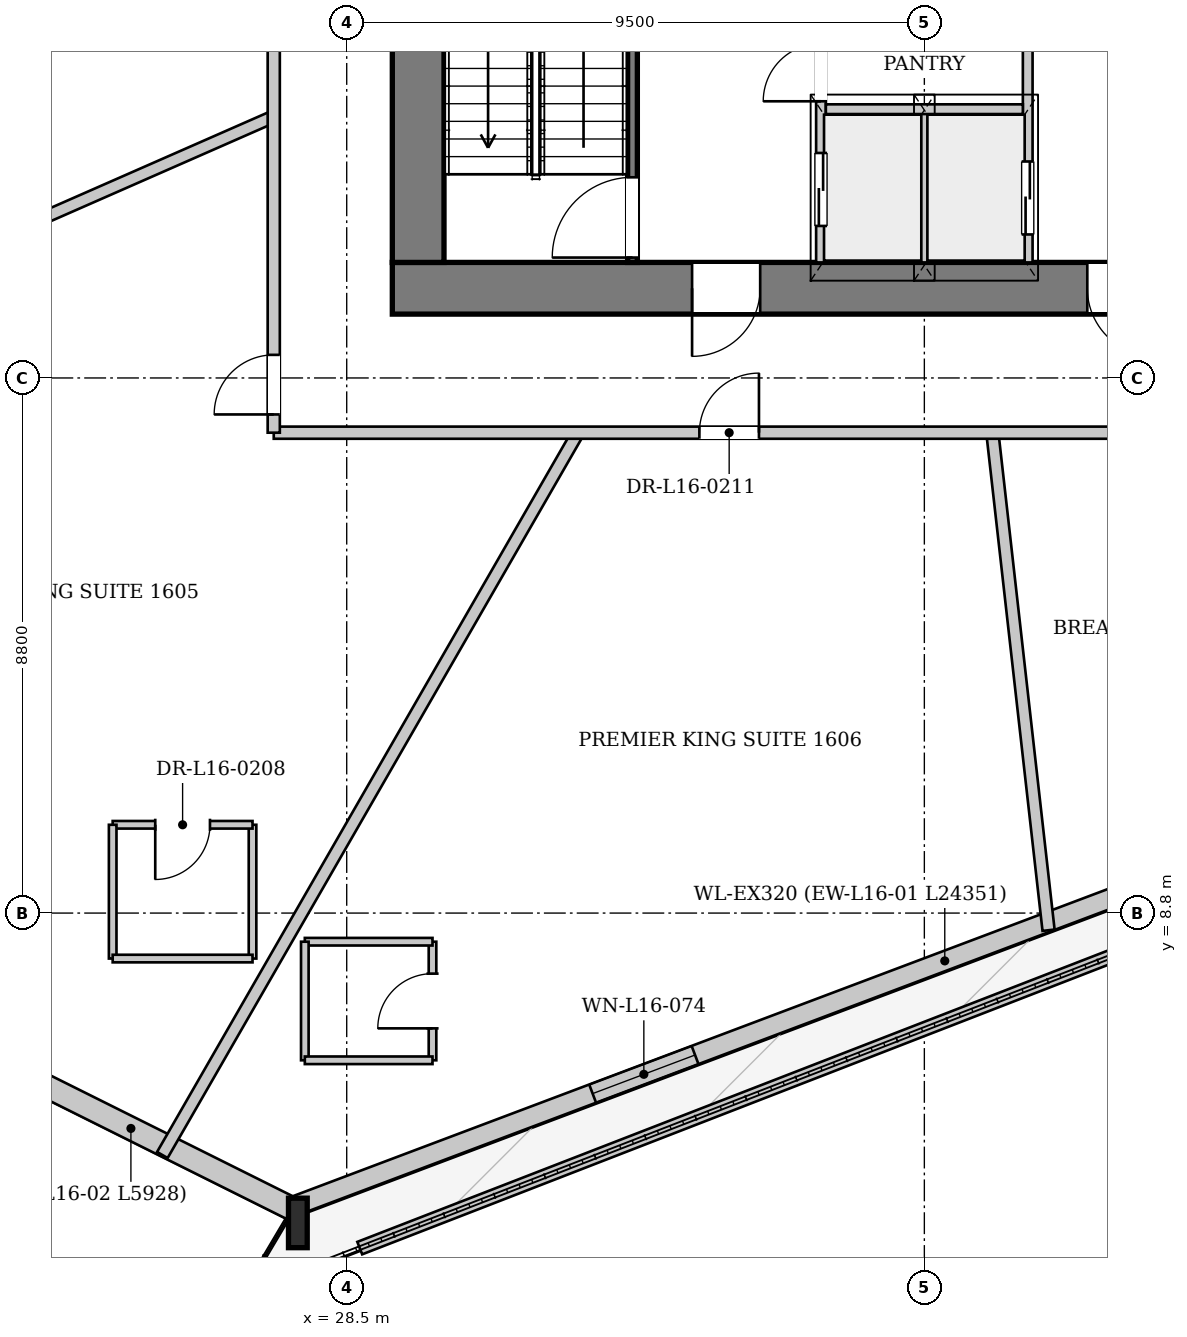
"""IFC4 building model, lengths in metres.
Left out: names, types, materials, properties, quantities, classifications, styles, units other than length and angle.
Written with IfcOpenShell. Run it as: python <this file> out.ifc"""

import sys

from ifc_helpers import new_model, si_unit, direction, frame, frame_2d, origin, origin_2d, place, context, subcontext, project, spatial, rectangle, i_section, extrude, source, transform, mapped, element, fill, save


model = new_model("IFC4")
c1 = context("Model", 3, precision=1e-05, world=origin(), true_north=direction((0.0, 1.0)))
c2 = subcontext(c1, "Body", "Model", "MODEL_VIEW")
j1 = project(units=[si_unit("LENGTHUNIT", "METRE"), si_unit("PLANEANGLEUNIT", "RADIAN")], contexts=[c1])
p1 = place(None, origin())
s1 = spatial("IfcSite", under=j1, at=p1, CompositionType="ELEMENT")
p2 = place(p1, origin())
s2 = spatial("IfcBuilding", under=s1, at=p2, CompositionType="ELEMENT")
p3 = place(p2, frame((0.0, 0.0, 64.8)))
s3 = spatial("IfcBuildingStorey", under=s2, at=p3, CompositionType="ELEMENT", Elevation=64.8)
m1 = source(origin(), c2, "Body", "SweptSolid", [
    extrude(i_section(OverallWidth=0.308, OverallDepth=0.814, WebThickness=0.021, FlangeThickness=0.04, at=origin_2d()), origin(), (0.0, 0.0, 1.0), 3.406),
])
p4 = place(p3, frame((27.518, 3.766, 0.0), z_axis=(0.10458259248, -0.036198909666, 0.993857193106), x_axis=(0.327088317834, 0.944993773703, 0.0)))
e1 = element("IfcColumn", 1, at=p4, inside=s3, PredefinedType="COLUMN", context=c2, shape_type="MappedRepresentation", body=[
    mapped(m1, transform((0.0, 0.0, 0.0), x_axis=(1.0, 0.0, 0.0), y_axis=(0.0, 1.0, 0.0), z_axis=(0.0, 0.0, 1.0), scale=1.0)),
])
p5 = place(p3, frame((50.249, 12.503, 0.0), z_axis=(0.0, 0.0, 1.0), x_axis=(-0.935754406197, -0.352652366054, 0.0)))
e2 = element("IfcWall", 2, at=p5, inside=s3, PredefinedType="SOLIDWALL", context=c2, shape_type="SweptSolid", body=[
    extrude(rectangle(XDim=24.352, YDim=0.32, at=frame_2d((12.176, 0.0))), origin(), (0.0, 0.0, 1.0), 2.592),
])
p6 = place(p5, frame((7.242, 0.0, 0.0)))
e3 = element("IfcOpeningElement", 3, at=p6, cuts=e2, PredefinedType="OPENING", context=c2, shape_type="SweptSolid", body=[
    extrude(rectangle(XDim=1.1, YDim=2.3, at=frame_2d((0.55, 1.15))), frame((0.0, 0.17, 0.0), z_axis=(0.0, -1.0, 0.0), x_axis=(1.0, 0.0, 0.0)), (0.0, 0.0, 1.0), 0.34),
])
p7 = place(p5, frame((17.12, 0.0, 0.272)))
e4 = element("IfcOpeningElement", 4, at=p7, cuts=e2, PredefinedType="OPENING", context=c2, shape_type="SweptSolid", body=[
    extrude(rectangle(XDim=1.8, YDim=2.2, at=frame_2d((0.9, 1.1))), frame((0.0, 0.17, 0.0), z_axis=(0.0, -1.0, 0.0), x_axis=(1.0, 0.0, 0.0)), (0.0, 0.0, 1.0), 0.34),
])
p8 = place(p3, frame((27.603, 3.936, 0.0), z_axis=(0.0, 0.0, 1.0), x_axis=(-0.894929094808, 0.446208376508, 0.0)))
e5 = element("IfcWall", 5, at=p8, inside=s3, PredefinedType="SOLIDWALL", context=c2, shape_type="SweptSolid", body=[
    extrude(rectangle(XDim=5.928, YDim=0.38, at=frame_2d((2.964, 0.0))), origin(), (0.0, 0.0, 1.0), 2.592),
])
p9 = place(p3, frame((28.714, 3.29, 0.0), z_axis=(0.0, 0.0, 1.0), x_axis=(0.932244858771, 0.361828030003, 0.0)))
e6 = element("IfcWall", 6, at=p9, inside=s3, PredefinedType="PARAPET", context=c2, shape_type="SweptSolid", body=[
    extrude(rectangle(XDim=21.613, YDim=0.22, at=frame_2d((10.807, 0.0))), origin(), (0.0, 0.0, 1.0), 0.3),
])
p10 = place(p3, frame((46.75, 19.075, 0.0), z_axis=(0.0, 0.0, 1.0), x_axis=(-1.0, 0.0, 0.0)))
e7 = element("IfcWall", 7, at=p10, inside=s3, PredefinedType="SHEAR", context=c2, shape_type="SweptSolid", body=[
    extrude(rectangle(XDim=17.5, YDim=0.85, at=frame_2d((8.75, 0.0))), origin(), (0.0, 0.0, 1.0), 3.3),
])
p11 = place(p10, frame((4.95, 0.0, 0.0)))
e8 = element("IfcOpeningElement", 8, at=p11, cuts=e7, PredefinedType="OPENING", context=c2, shape_type="SweptSolid", body=[
    extrude(rectangle(XDim=1.12, YDim=2.25, at=frame_2d((0.56, 1.125))), frame((0.0, 0.435, 0.0), z_axis=(0.0, -1.0, 0.0), x_axis=(1.0, 0.0, 0.0)), (0.0, 0.0, 1.0), 0.87),
])
p12 = place(p10, frame((11.45, 0.0, 0.0)))
e9 = element("IfcOpeningElement", 9, at=p12, cuts=e7, PredefinedType="OPENING", context=c2, shape_type="SweptSolid", body=[
    extrude(rectangle(XDim=1.12, YDim=2.25, at=frame_2d((0.56, 1.125))), frame((0.0, 0.435, 0.0), z_axis=(0.0, -1.0, 0.0), x_axis=(1.0, 0.0, 0.0)), (0.0, 0.0, 1.0), 0.87),
])
p13 = place(p3, frame((29.675, 19.5, 0.0), z_axis=(0.0, 0.0, 1.0), x_axis=(0.0, 1.0, 0.0)))
e10 = element("IfcWall", 10, at=p13, inside=s3, PredefinedType="SHEAR", context=c2, shape_type="SweptSolid", body=[
    extrude(rectangle(XDim=14.2, YDim=0.85, at=frame_2d((7.1, 0.0))), origin(), (0.0, 0.0, 1.0), 3.3),
])
p14 = place(p13, frame((7.42, 0.0, 0.0)))
e11 = element("IfcOpeningElement", 11, at=p14, cuts=e10, PredefinedType="OPENING", context=c2, shape_type="SweptSolid", body=[
    extrude(rectangle(XDim=1.6, YDim=2.2, at=frame_2d((0.8, 1.1))), frame((0.0, 0.435, 0.0), z_axis=(0.0, -1.0, 0.0), x_axis=(1.0, 0.0, 0.0)), (0.0, 0.0, 1.0), 0.87),
])
p15 = place(p3, frame((33.2, 19.5, 0.0), z_axis=(0.0, 0.0, 1.0), x_axis=(0.0, 1.0, 0.0)))
e12 = element("IfcWall", 12, at=p15, inside=s3, PredefinedType="PARTITIONING", context=c2, shape_type="SweptSolid", body=[
    extrude(rectangle(XDim=7.46, YDim=0.16, at=frame_2d((3.73, 0.0))), origin(), (0.0, 0.0, 1.0), 3.3),
])
p16 = place(p15, frame((0.08, 0.0, 0.0)))
e13 = element("IfcOpeningElement", 13, at=p16, cuts=e12, PredefinedType="OPENING", context=c2, shape_type="SweptSolid", body=[
    extrude(rectangle(XDim=1.32, YDim=2.2, at=frame_2d((0.66, 1.1))), frame((0.0, 0.09, 0.0), z_axis=(0.0, -1.0, 0.0), x_axis=(1.0, 0.0, 0.0)), (0.0, 0.0, 1.0), 0.18),
])
p17 = place(p3, frame((36.3, 19.5, 0.0), z_axis=(0.0, 0.0, 1.0), x_axis=(0.0, 1.0, 0.0)))
e14 = element("IfcWall", 14, at=p17, inside=s3, PredefinedType="PARTITIONING", context=c2, shape_type="SweptSolid", body=[
    extrude(rectangle(XDim=4.78, YDim=0.16, at=frame_2d((2.39, 0.0))), origin(), (0.0, 0.0, 1.0), 3.3),
])
p18 = place(p17, frame((0.6, 0.0, 0.0)))
e15 = element("IfcOpeningElement", 15, at=p18, cuts=e14, PredefinedType="OPENING", context=c2, shape_type="SweptSolid", body=[
    extrude(rectangle(XDim=1.2, YDim=2.2, at=frame_2d((0.6, 1.1))), frame((0.0, 0.09, 0.0), z_axis=(0.0, -1.0, 0.0), x_axis=(1.0, 0.0, 0.0)), (0.0, 0.0, 1.0), 0.18),
])
p19 = place(p17, frame((2.65, 0.0, 0.0)))
e16 = element("IfcOpeningElement", 16, at=p19, cuts=e14, PredefinedType="OPENING", context=c2, shape_type="SweptSolid", body=[
    extrude(rectangle(XDim=0.95, YDim=2.1, at=frame_2d((0.475, 1.05))), frame((0.0, 0.09, 0.0), z_axis=(0.0, -1.0, 0.0), x_axis=(1.0, 0.0, 0.0)), (0.0, 0.0, 1.0), 0.18),
])
p20 = place(p3, frame((39.7, 24.28, 0.0), z_axis=(0.0, 0.0, 1.0), x_axis=(0.0, -1.0, 0.0)))
e17 = element("IfcWall", 17, at=p20, inside=s3, PredefinedType="PARTITIONING", context=c2, shape_type="SweptSolid", body=[
    extrude(rectangle(XDim=4.78, YDim=0.16, at=frame_2d((2.39, 0.0))), origin(), (0.0, 0.0, 1.0), 3.3),
])
p21 = place(p20, frame((3.12, 0.0, 0.0)))
e18 = element("IfcOpeningElement", 18, at=p21, cuts=e17, PredefinedType="OPENING", context=c2, shape_type="SweptSolid", body=[
    extrude(rectangle(XDim=1.2, YDim=2.2, at=frame_2d((0.6, 1.1))), frame((0.0, 0.09, 0.0), z_axis=(0.0, -1.0, 0.0), x_axis=(1.0, 0.0, 0.0)), (0.0, 0.0, 1.0), 0.18),
])
p22 = place(p3, frame((38.0, 19.5, 0.0), z_axis=(0.0, 0.0, 1.0), x_axis=(0.0, 1.0, 0.0)))
e19 = element("IfcWall", 19, at=p22, inside=s3, PredefinedType="PARTITIONING", context=c2, shape_type="SweptSolid", body=[
    extrude(rectangle(XDim=2.46, YDim=0.125, at=frame_2d((1.23, 0.0))), origin(), (0.0, 0.0, 1.0), 3.3),
])
p23 = place(p3, frame((36.38, 22.02, 0.0), z_axis=(0.0, 0.0, 1.0), x_axis=(1.0, 0.0, 0.0)))
e20 = element("IfcWall", 20, at=p23, inside=s3, PredefinedType="PARTITIONING", context=c2, shape_type="SweptSolid", body=[
    extrude(rectangle(XDim=3.24, YDim=0.16, at=frame_2d((1.62, 0.0))), origin(), (0.0, 0.0, 1.0), 3.3),
])
p24 = place(p3, frame((27.3, 21.899, 0.0), z_axis=(0.0, 0.0, 1.0), x_axis=(-0.915540001972, -0.402226931955, 0.0)))
e21 = element("IfcWall", 21, at=p24, inside=s3, PredefinedType="PARTITIONING", context=c2, shape_type="SweptSolid", body=[
    extrude(rectangle(XDim=10.011, YDim=0.2, at=frame_2d((5.005, 0.0))), origin(), (0.0, 0.0, 1.0), 3.3),
])
p25 = place(p3, frame((32.303, 16.7, 0.0), z_axis=(0.0, 0.0, 1.0), x_axis=(-0.498759278796, -0.866740550462, 0.0)))
e22 = element("IfcWall", 22, at=p25, inside=s3, PredefinedType="PARTITIONING", context=c2, shape_type="SweptSolid", body=[
    extrude(rectangle(XDim=13.704, YDim=0.2, at=frame_2d((6.852, 0.0))), origin(), (0.0, 0.0, 1.0), 3.3),
])
p26 = place(p3, frame((39.118, 16.7, 0.0), z_axis=(0.0, 0.0, 1.0), x_axis=(0.112253711385, -0.993679578275, 0.0)))
e23 = element("IfcWall", 23, at=p26, inside=s3, PredefinedType="PARTITIONING", context=c2, shape_type="SweptSolid", body=[
    extrude(rectangle(XDim=8.234, YDim=0.2, at=frame_2d((4.117, 0.0))), origin(), (0.0, 0.0, 1.0), 3.3),
])
p27 = place(p3, frame((26.951, 8.052, 0.0), z_axis=(0.0, 0.0, 1.0), x_axis=(0.0, 1.0, 0.0)))
e24 = element("IfcWall", 24, at=p27, inside=s3, PredefinedType="PARTITIONING", context=c2, shape_type="SweptSolid", body=[
    extrude(rectangle(XDim=2.2, YDim=0.125, at=frame_2d((1.1, 0.0))), origin(), (0.0, 0.0, 1.0), 3.3),
])
p28 = place(p3, frame((26.951, 10.252, 0.0), z_axis=(0.0, 0.0, 1.0), x_axis=(-1.0, 0.0, 0.0)))
e25 = element("IfcWall", 25, at=p28, inside=s3, PredefinedType="PARTITIONING", context=c2, shape_type="SweptSolid", body=[
    extrude(rectangle(XDim=2.3, YDim=0.125, at=frame_2d((1.15, 0.0))), origin(), (0.0, 0.0, 1.0), 3.3),
])
p29 = place(p28, frame((0.7, 0.0, 0.0)))
e26 = element("IfcOpeningElement", 26, at=p29, cuts=e25, PredefinedType="OPENING", context=c2, shape_type="SweptSolid", body=[
    extrude(rectangle(XDim=0.9, YDim=2.1, at=frame_2d((0.45, 1.05))), frame((0.0, 0.073, 0.0), z_axis=(0.0, -1.0, 0.0), x_axis=(1.0, 0.0, 0.0)), (0.0, 0.0, 1.0), 0.145),
])
p30 = place(p3, frame((24.651, 10.252, 0.0), z_axis=(0.0, 0.0, 1.0), x_axis=(0.0, -1.0, 0.0)))
e27 = element("IfcWall", 27, at=p30, inside=s3, PredefinedType="PARTITIONING", context=c2, shape_type="SweptSolid", body=[
    extrude(rectangle(XDim=2.2, YDim=0.125, at=frame_2d((1.1, 0.0))), origin(), (0.0, 0.0, 1.0), 3.3),
])
p31 = place(p3, frame((24.651, 8.052, 0.0), z_axis=(0.0, 0.0, 1.0), x_axis=(1.0, 0.0, 0.0)))
e28 = element("IfcWall", 28, at=p31, inside=s3, PredefinedType="PARTITIONING", context=c2, shape_type="SweptSolid", body=[
    extrude(rectangle(XDim=2.3, YDim=0.125, at=frame_2d((1.15, 0.0))), origin(), (0.0, 0.0, 1.0), 3.3),
])
p32 = place(p3, frame((29.911, 6.379, 0.0), z_axis=(0.0, 0.0, 1.0), x_axis=(0.0, 1.0, 0.0)))
e29 = element("IfcWall", 29, at=p32, inside=s3, PredefinedType="PARTITIONING", context=c2, shape_type="SweptSolid", body=[
    extrude(rectangle(XDim=1.95, YDim=0.125, at=frame_2d((0.975, 0.0))), origin(), (0.0, 0.0, 1.0), 2.795),
])
p33 = place(p32, frame((0.525, 0.0, 0.0)))
e30 = element("IfcOpeningElement", 30, at=p33, cuts=e29, PredefinedType="OPENING", context=c2, shape_type="SweptSolid", body=[
    extrude(rectangle(XDim=0.9, YDim=2.1, at=frame_2d((0.45, 1.05))), frame((0.0, 0.073, 0.0), z_axis=(0.0, -1.0, 0.0), x_axis=(1.0, 0.0, 0.0)), (0.0, 0.0, 1.0), 0.145),
])
p34 = place(p3, frame((29.911, 8.329, 0.0), z_axis=(0.0, 0.0, 1.0), x_axis=(-1.0, 0.0, 0.0)))
e31 = element("IfcWall", 31, at=p34, inside=s3, PredefinedType="PARTITIONING", context=c2, shape_type="SweptSolid", body=[
    extrude(rectangle(XDim=2.1, YDim=0.125, at=frame_2d((1.05, 0.0))), origin(), (0.0, 0.0, 1.0), 3.3),
])
p35 = place(p3, frame((27.811, 8.329, 0.0), z_axis=(0.0, 0.0, 1.0), x_axis=(0.0, -1.0, 0.0)))
e32 = element("IfcWall", 32, at=p35, inside=s3, PredefinedType="PARTITIONING", context=c2, shape_type="SweptSolid", body=[
    extrude(rectangle(XDim=1.95, YDim=0.125, at=frame_2d((0.975, 0.0))), origin(), (0.0, 0.0, 1.0), 3.3),
])
p36 = place(p3, frame((27.811, 6.379, 0.0), z_axis=(0.0, 0.0, 1.0), x_axis=(1.0, 0.0, 0.0)))
e33 = element("IfcWall", 33, at=p36, inside=s3, PredefinedType="PARTITIONING", context=c2, shape_type="SweptSolid", body=[
    extrude(rectangle(XDim=2.1, YDim=0.125, at=frame_2d((1.05, 0.0))), origin(), (0.0, 0.0, 1.0), 3.3),
])
p37 = place(p3, frame((27.3, 16.7, 0.0), z_axis=(0.0, 0.0, 1.0), x_axis=(1.0, 0.0, 0.0)))
e34 = element("IfcWall", 34, at=p37, inside=s3, PredefinedType="PARTITIONING", context=c2, shape_type="SweptSolid", body=[
    extrude(rectangle(XDim=21.4, YDim=0.2, at=frame_2d((10.7, 0.0))), origin(), (0.0, 0.0, 1.0), 3.3),
])
p38 = place(p37, frame((7.0, 0.0, 0.0)))
e35 = element("IfcOpeningElement", 35, at=p38, cuts=e34, PredefinedType="OPENING", context=c2, shape_type="SweptSolid", body=[
    extrude(rectangle(XDim=0.98, YDim=2.15, at=frame_2d((0.49, 1.075))), frame((0.0, 0.11, 0.0), z_axis=(0.0, -1.0, 0.0), x_axis=(1.0, 0.0, 0.0)), (0.0, 0.0, 1.0), 0.22),
])
p39 = place(p37, frame((17.868, 0.0, 0.0)))
e36 = element("IfcOpeningElement", 36, at=p39, cuts=e34, PredefinedType="OPENING", context=c2, shape_type="SweptSolid", body=[
    extrude(rectangle(XDim=0.98, YDim=2.15, at=frame_2d((0.49, 1.075))), frame((0.0, 0.11, 0.0), z_axis=(0.0, -1.0, 0.0), x_axis=(1.0, 0.0, 0.0)), (0.0, 0.0, 1.0), 0.22),
])
p40 = place(p3, frame((27.3, 16.7, 0.0), z_axis=(0.0, 0.0, 1.0), x_axis=(0.0, 1.0, 0.0)))
e37 = element("IfcWall", 37, at=p40, inside=s3, PredefinedType="PARTITIONING", context=c2, shape_type="SweptSolid", body=[
    extrude(rectangle(XDim=19.8, YDim=0.2, at=frame_2d((9.9, 0.0))), origin(), (0.0, 0.0, 1.0), 3.3),
])
p41 = place(p40, frame((8.604, 0.0, 0.0)))
e38 = element("IfcOpeningElement", 38, at=p41, cuts=e37, PredefinedType="OPENING", context=c2, shape_type="SweptSolid", body=[
    extrude(rectangle(XDim=0.98, YDim=2.15, at=frame_2d((0.49, 1.075))), frame((0.0, 0.11, 0.0), z_axis=(0.0, -1.0, 0.0), x_axis=(1.0, 0.0, 0.0)), (0.0, 0.0, 1.0), 0.22),
])
p42 = place(p40, frame((0.3, 0.0, 0.0)))
e39 = element("IfcOpeningElement", 39, at=p42, cuts=e37, PredefinedType="OPENING", context=c2, shape_type="SweptSolid", body=[
    extrude(rectangle(XDim=0.98, YDim=2.15, at=frame_2d((0.49, 1.075))), frame((0.0, 0.11, 0.0), z_axis=(0.0, -1.0, 0.0), x_axis=(1.0, 0.0, 0.0)), (0.0, 0.0, 1.0), 0.22),
])
m2 = source(origin(), c2, "Body", "SweptSolid", [
    extrude(rectangle(XDim=1.8, YDim=2.2, at=frame_2d((0.9, 1.1))), frame((0.0, 0.03, 0.0), z_axis=(0.0, -1.0, 0.0), x_axis=(1.0, 0.0, 0.0)), (0.0, 0.0, 1.0), 0.06),
])
p43 = place(p7, origin())
e40 = element("IfcWindow", 40, at=p43, inside=s3, PartitioningType="SINGLE_PANEL", PredefinedType="WINDOW", context=c2, shape_type="MappedRepresentation", body=[
    mapped(m2, transform((0.0, 0.0, 0.0), x_axis=(1.0, 0.0, 0.0), y_axis=(0.0, 1.0, 0.0), z_axis=(0.0, 0.0, 1.0), scale=1.0)),
])
fill(e4, e40)
m3 = source(origin(), c2, "Body", "SweptSolid", [
    extrude(rectangle(XDim=1.12, YDim=2.25, at=frame_2d((0.56, 1.125))), frame((0.0, 0.025, 0.0), z_axis=(0.0, -1.0, 0.0), x_axis=(1.0, 0.0, 0.0)), (0.0, 0.0, 1.0), 0.05),
])
p44 = place(p11, origin())
e41 = element("IfcDoor", 41, at=p44, inside=s3, OperationType="SINGLE_SWING_LEFT", PredefinedType="DOOR", context=c2, shape_type="MappedRepresentation", body=[
    mapped(m3, transform((0.0, 0.0, 0.0), x_axis=(1.0, 0.0, 0.0), y_axis=(0.0, 1.0, 0.0), z_axis=(0.0, 0.0, 1.0), scale=1.0)),
])
fill(e8, e41)
p45 = place(p12, origin())
e42 = element("IfcDoor", 42, at=p45, inside=s3, OperationType="SINGLE_SWING_RIGHT", PredefinedType="DOOR", context=c2, shape_type="MappedRepresentation", body=[
    mapped(m3, transform((0.0, 0.0, 0.0), x_axis=(1.0, 0.0, 0.0), y_axis=(0.0, 1.0, 0.0), z_axis=(0.0, 0.0, 1.0), scale=1.0)),
])
fill(e9, e42)
m4 = source(origin(), c2, "Body", "SweptSolid", [
    extrude(rectangle(XDim=1.32, YDim=2.2, at=frame_2d((0.66, 1.1))), frame((0.0, 0.025, 0.0), z_axis=(0.0, -1.0, 0.0), x_axis=(1.0, 0.0, 0.0)), (0.0, 0.0, 1.0), 0.05),
])
p46 = place(p16, origin())
e43 = element("IfcDoor", 43, at=p46, inside=s3, OperationType="SINGLE_SWING_LEFT", PredefinedType="DOOR", context=c2, shape_type="MappedRepresentation", body=[
    mapped(m4, transform((0.0, 0.0, 0.0), x_axis=(1.0, 0.0, 0.0), y_axis=(0.0, 1.0, 0.0), z_axis=(0.0, 0.0, 1.0), scale=1.0)),
])
fill(e13, e43)
m5 = source(origin(), c2, "Body", "SweptSolid", [
    extrude(rectangle(XDim=1.2, YDim=2.2, at=frame_2d((0.6, 1.1))), frame((0.0, 0.025, 0.0), z_axis=(0.0, -1.0, 0.0), x_axis=(1.0, 0.0, 0.0)), (0.0, 0.0, 1.0), 0.05),
])
p47 = place(p18, origin())
e44 = element("IfcDoor", 44, at=p47, inside=s3, OperationType="DOUBLE_DOOR_SLIDING", PredefinedType="DOOR", context=c2, shape_type="MappedRepresentation", body=[
    mapped(m5, transform((0.0, 0.0, 0.0), x_axis=(1.0, 0.0, 0.0), y_axis=(0.0, 1.0, 0.0), z_axis=(0.0, 0.0, 1.0), scale=1.0)),
])
fill(e15, e44)
m6 = source(origin(), c2, "Body", "SweptSolid", [
    extrude(rectangle(XDim=0.95, YDim=2.1, at=frame_2d((0.475, 1.05))), frame((0.0, 0.025, 0.0), z_axis=(0.0, -1.0, 0.0), x_axis=(1.0, 0.0, 0.0)), (0.0, 0.0, 1.0), 0.05),
])
p48 = place(p19, origin())
e45 = element("IfcDoor", 45, at=p48, inside=s3, OperationType="SINGLE_SWING_LEFT", PredefinedType="DOOR", context=c2, shape_type="MappedRepresentation", body=[
    mapped(m6, transform((0.0, 0.0, 0.0), x_axis=(1.0, 0.0, 0.0), y_axis=(0.0, 1.0, 0.0), z_axis=(0.0, 0.0, 1.0), scale=1.0)),
])
fill(e16, e45)
p49 = place(p21, origin())
e46 = element("IfcDoor", 46, at=p49, inside=s3, OperationType="DOUBLE_DOOR_SLIDING", PredefinedType="DOOR", context=c2, shape_type="MappedRepresentation", body=[
    mapped(m5, transform((0.0, 0.0, 0.0), x_axis=(1.0, 0.0, 0.0), y_axis=(0.0, 1.0, 0.0), z_axis=(0.0, 0.0, 1.0), scale=1.0)),
])
fill(e18, e46)
m7 = source(origin(), c2, "Body", "SweptSolid", [
    extrude(rectangle(XDim=0.9, YDim=2.1, at=frame_2d((0.45, 1.05))), frame((0.0, 0.025, 0.0), z_axis=(0.0, -1.0, 0.0), x_axis=(1.0, 0.0, 0.0)), (0.0, 0.0, 1.0), 0.05),
])
p50 = place(p29, origin())
e47 = element("IfcDoor", 47, at=p50, inside=s3, OperationType="SINGLE_SWING_RIGHT", PredefinedType="DOOR", context=c2, shape_type="MappedRepresentation", body=[
    mapped(m7, transform((0.0, 0.0, 0.0), x_axis=(1.0, 0.0, 0.0), y_axis=(0.0, 1.0, 0.0), z_axis=(0.0, 0.0, 1.0), scale=1.0)),
])
fill(e26, e47)
p51 = place(p33, origin())
e48 = element("IfcDoor", 48, at=p51, inside=s3, OperationType="SINGLE_SWING_LEFT", PredefinedType="DOOR", context=c2, shape_type="MappedRepresentation", body=[
    mapped(m7, transform((0.0, 0.0, 0.0), x_axis=(1.0, 0.0, 0.0), y_axis=(0.0, 1.0, 0.0), z_axis=(0.0, 0.0, 1.0), scale=1.0)),
])
fill(e30, e48)
m8 = source(origin(), c2, "Body", "SweptSolid", [
    extrude(rectangle(XDim=0.98, YDim=2.15, at=frame_2d((0.49, 1.075))), frame((0.0, 0.025, 0.0), z_axis=(0.0, -1.0, 0.0), x_axis=(1.0, 0.0, 0.0)), (0.0, 0.0, 1.0), 0.05),
])
p52 = place(p38, origin())
e49 = element("IfcDoor", 49, at=p52, inside=s3, OperationType="SINGLE_SWING_RIGHT", PredefinedType="DOOR", context=c2, shape_type="MappedRepresentation", body=[
    mapped(m8, transform((0.0, 0.0, 0.0), x_axis=(1.0, 0.0, 0.0), y_axis=(0.0, 1.0, 0.0), z_axis=(0.0, 0.0, 1.0), scale=1.0)),
])
fill(e35, e49)
p53 = place(p42, origin())
e50 = element("IfcDoor", 50, at=p53, inside=s3, OperationType="SINGLE_SWING_LEFT", PredefinedType="DOOR", context=c2, shape_type="MappedRepresentation", body=[
    mapped(m8, transform((0.0, 0.0, 0.0), x_axis=(1.0, 0.0, 0.0), y_axis=(0.0, 1.0, 0.0), z_axis=(0.0, 0.0, 1.0), scale=1.0)),
])
fill(e39, e50)
save(model, sys.argv[1])
